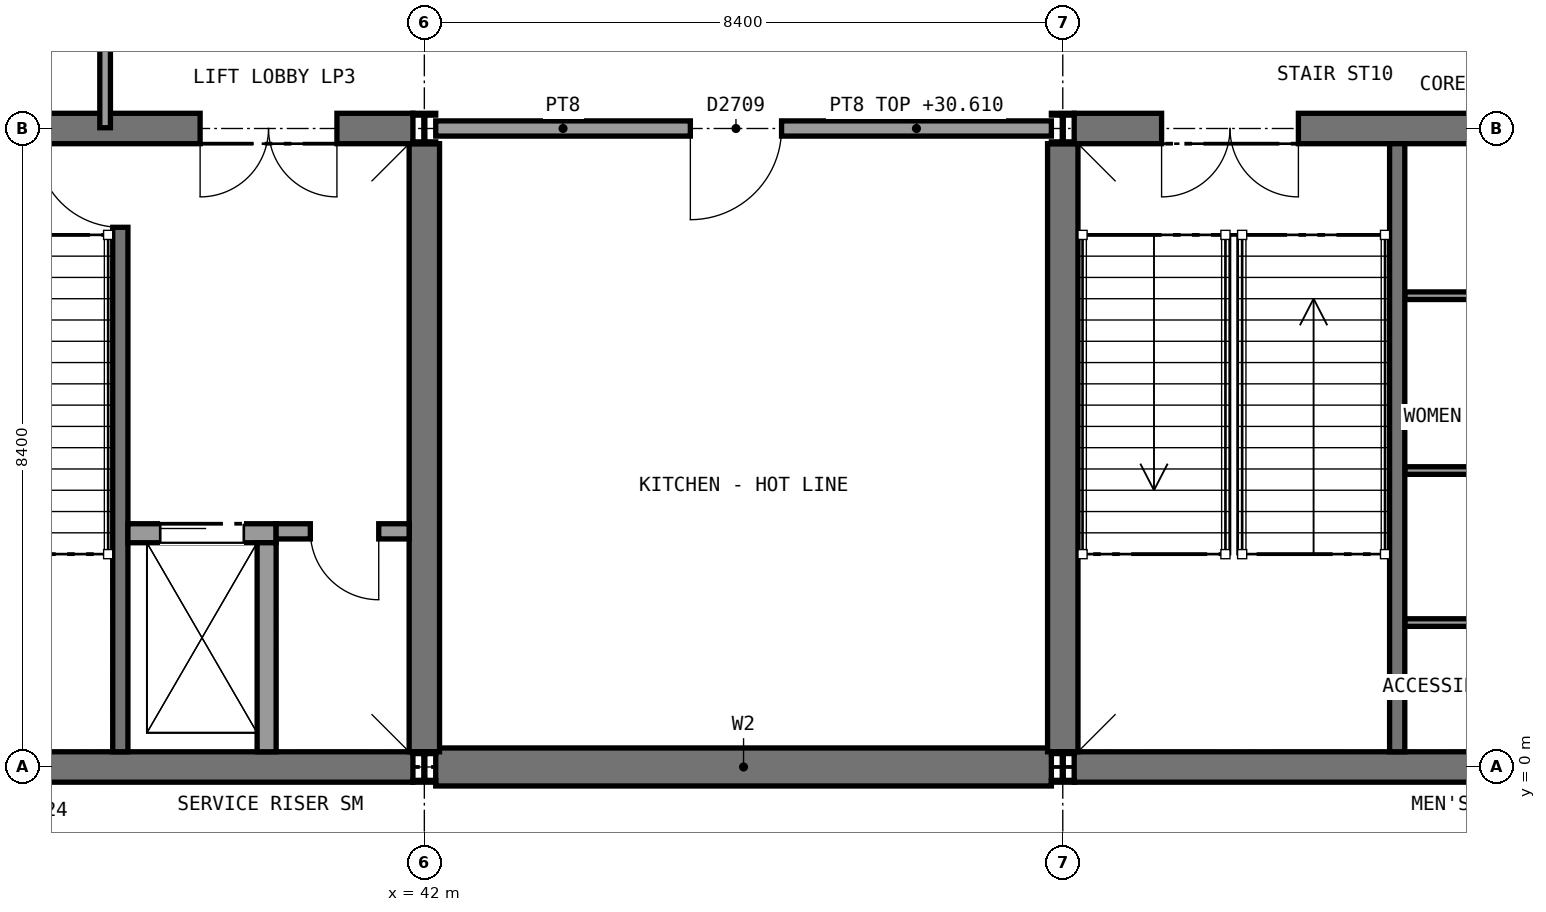
"""IFC4 building model, lengths in metres.
Left out: names, types, materials, properties, quantities, classifications, styles, units other than length and angle.
Written with IfcOpenShell. Run it as: python <this file> out.ifc"""

import sys

from ifc_helpers import new_model, si_unit, direction, frame, frame_2d, origin, origin_2d, place, context, subcontext, project, spatial, rectangle, i_section, extrude, element, fill, save


model = new_model("IFC4")
c1 = context("Model", 3, precision=1e-05, world=origin(), true_north=direction((0.0, 1.0)))
c2 = subcontext(c1, "Body", "Model", "MODEL_VIEW")
j1 = project(units=[si_unit("LENGTHUNIT", "METRE"), si_unit("PLANEANGLEUNIT", "RADIAN")], contexts=[c1])
p1 = place(None, origin())
s1 = spatial("IfcSite", under=j1, at=p1, CompositionType="ELEMENT")
p2 = place(p1, origin())
s2 = spatial("IfcBuilding", under=s1, at=p2, CompositionType="ELEMENT")
p3 = place(p2, frame((0.0, 0.0, 25.8)))
s3 = spatial("IfcBuildingStorey", under=s2, at=p3, CompositionType="ELEMENT", Elevation=25.8)
p4 = place(p3, frame((42.15, 0.0, 0.0), z_axis=(0.0, 0.0, 1.0), x_axis=(1.0, 0.0, 0.0)))
e1 = element("IfcWall", 1, at=p4, inside=s3, PredefinedType="SHEAR", context=c2, shape_type="SweptSolid", body=[
    extrude(rectangle(XDim=8.1, YDim=0.5, at=frame_2d((4.05, 0.0))), origin(), (0.0, 0.0, 1.0), 5.2),
])
p5 = place(p3, frame((33.75, 0.0, 0.0), z_axis=(0.0, 0.0, 1.0), x_axis=(1.0, 0.0, 0.0)))
e2 = element("IfcWall", 2, at=p5, inside=s3, PredefinedType="SHEAR", context=c2, shape_type="SweptSolid", body=[
    extrude(rectangle(XDim=8.1, YDim=0.4, at=frame_2d((4.05, 0.0))), origin(), (0.0, 0.0, 1.0), 4.51),
])
p6 = place(p3, frame((33.75, 8.4, 0.0), z_axis=(0.0, 0.0, 1.0), x_axis=(1.0, 0.0, 0.0)))
e3 = element("IfcWall", 3, at=p6, inside=s3, PredefinedType="SHEAR", context=c2, shape_type="SweptSolid", body=[
    extrude(rectangle(XDim=8.1, YDim=0.4, at=frame_2d((4.05, 0.0))), origin(), (0.0, 0.0, 1.0), 4.51),
])
p7 = place(p6, frame((1.15, 0.0, 0.0)))
e4 = element("IfcOpeningElement", 4, at=p7, cuts=e3, PredefinedType="OPENING", context=c2, shape_type="SweptSolid", body=[
    extrude(rectangle(XDim=1.8, YDim=2.1, at=frame_2d((0.9, 1.05))), frame((0.0, 0.21, 0.0), z_axis=(0.0, -1.0, 0.0), x_axis=(1.0, 0.0, 0.0)), (0.0, 0.0, 1.0), 0.42),
])
p8 = place(p6, frame((5.3, 0.0, 0.0)))
e5 = element("IfcOpeningElement", 5, at=p8, cuts=e3, PredefinedType="OPENING", context=c2, shape_type="SweptSolid", body=[
    extrude(rectangle(XDim=1.8, YDim=2.1, at=frame_2d((0.9, 1.05))), frame((0.0, 0.21, 0.0), z_axis=(0.0, -1.0, 0.0), x_axis=(1.0, 0.0, 0.0)), (0.0, 0.0, 1.0), 0.42),
])
p9 = place(p3, frame((42.0, 0.2, 0.0), z_axis=(0.0, 0.0, 1.0), x_axis=(0.0, 1.0, 0.0)))
e6 = element("IfcWall", 6, at=p9, inside=s3, PredefinedType="SHEAR", context=c2, shape_type="SweptSolid", body=[
    extrude(rectangle(XDim=8.0, YDim=0.4, at=frame_2d((4.0, 0.0))), origin(), (0.0, 0.0, 1.0), 5.2),
])
p10 = place(p3, frame((50.55, 0.0, 0.0), z_axis=(0.0, 0.0, 1.0), x_axis=(1.0, 0.0, 0.0)))
e7 = element("IfcWall", 7, at=p10, inside=s3, PredefinedType="SHEAR", context=c2, shape_type="SweptSolid", body=[
    extrude(rectangle(XDim=8.1, YDim=0.4, at=frame_2d((4.05, 0.0))), origin(), (0.0, 0.0, 1.0), 4.51),
])
p11 = place(p3, frame((50.55, 8.4, 0.0), z_axis=(0.0, 0.0, 1.0), x_axis=(1.0, 0.0, 0.0)))
e8 = element("IfcWall", 8, at=p11, inside=s3, PredefinedType="SHEAR", context=c2, shape_type="SweptSolid", body=[
    extrude(rectangle(XDim=8.1, YDim=0.4, at=frame_2d((4.05, 0.0))), origin(), (0.0, 0.0, 1.0), 4.51),
])
p12 = place(p11, frame((1.15, 0.0, 0.0)))
e9 = element("IfcOpeningElement", 9, at=p12, cuts=e8, PredefinedType="OPENING", context=c2, shape_type="SweptSolid", body=[
    extrude(rectangle(XDim=1.8, YDim=2.1, at=frame_2d((0.9, 1.05))), frame((0.0, 0.21, 0.0), z_axis=(0.0, -1.0, 0.0), x_axis=(1.0, 0.0, 0.0)), (0.0, 0.0, 1.0), 0.42),
])
p13 = place(p11, frame((5.6, 0.0, 0.0)))
e10 = element("IfcOpeningElement", 10, at=p13, cuts=e8, PredefinedType="OPENING", context=c2, shape_type="SweptSolid", body=[
    extrude(rectangle(XDim=1.2, YDim=2.1, at=frame_2d((0.6, 1.05))), frame((0.0, 0.21, 0.0), z_axis=(0.0, -1.0, 0.0), x_axis=(1.0, 0.0, 0.0)), (0.0, 0.0, 1.0), 0.42),
])
p14 = place(p3, frame((50.4, 0.2, 0.0), z_axis=(0.0, 0.0, 1.0), x_axis=(0.0, 1.0, 0.0)))
e11 = element("IfcWall", 11, at=p14, inside=s3, PredefinedType="SHEAR", context=c2, shape_type="SweptSolid", body=[
    extrude(rectangle(XDim=8.0, YDim=0.4, at=frame_2d((4.0, 0.0))), origin(), (0.0, 0.0, 1.0), 5.2),
])
for number, where, z_axis, x_axis in (
    (12, (42.0, 0.0, 0.0), (0.0, 0.0, 1.0), (1.0, 0.0, 0.0)),
    (13, (42.0, 8.4, 0.0), (0.0, 0.0, 1.0), (1.0, 0.0, 0.0)),
    (14, (50.4, 0.0, 0.0), (0.0, 0.0, 1.0), (1.0, 0.0, 0.0)),
    (15, (50.4, 8.4, 0.0), (0.0, 0.0, 1.0), (1.0, 0.0, 0.0)),
):
    element("IfcColumn", number, at=place(p3, frame(where, z_axis=z_axis, x_axis=x_axis)), inside=s3, PredefinedType="COLUMN", context=c2, shape_type="SweptSolid", body=[
        extrude(i_section(OverallWidth=0.3, OverallDepth=0.4, WebThickness=0.013, FlangeThickness=0.024, FilletRadius=0.027, at=origin_2d()), origin(), (0.0, 0.0, 1.0), 5.4),
    ])
p15 = place(p3, frame((54.9, 6.2, 0.0), z_axis=(0.0, 0.0, 1.0), x_axis=(1.0, 0.0, 0.0)))
e16 = element("IfcWall", 16, at=p15, inside=s3, PredefinedType="PARTITIONING", context=c2, shape_type="SweptSolid", body=[
    extrude(rectangle(XDim=2.4, YDim=0.1, at=frame_2d((1.2, 0.0))), origin(), (0.0, 0.0, 1.0), 5.2),
])
p16 = place(p15, frame((0.85, 0.0, 0.0)))
e17 = element("IfcOpeningElement", 17, at=p16, cuts=e16, PredefinedType="OPENING", context=c2, shape_type="SweptSolid", body=[
    extrude(rectangle(XDim=0.9, YDim=2.1, at=frame_2d((0.45, 1.05))), frame((0.0, 0.06, 0.0), z_axis=(0.0, -1.0, 0.0), x_axis=(1.0, 0.0, 0.0)), (0.0, 0.0, 1.0), 0.12),
])
for number, where, z_axis, x_axis in (
    (18, (54.9, 3.9, 0.0), (0.0, 0.0, 1.0), (1.0, 0.0, 0.0)),
    (19, (54.9, 1.9, 0.0), (0.0, 0.0, 1.0), (1.0, 0.0, 0.0)),
):
    element("IfcWall", number, at=place(p3, frame(where, z_axis=z_axis, x_axis=x_axis)), inside=s3, PredefinedType="PARTITIONING", context=c2, shape_type="SweptSolid", body=[
        extrude(rectangle(XDim=2.4, YDim=0.1, at=frame_2d((1.2, 0.0))), origin(), (0.0, 0.0, 1.0), 5.2),
    ])
p17 = place(p3, frame((42.15, 8.4, 0.0), z_axis=(0.0, 0.0, 1.0), x_axis=(1.0, 0.0, 0.0)))
e20 = element("IfcWall", 20, at=p17, inside=s3, PredefinedType="SOLIDWALL", context=c2, shape_type="SweptSolid", body=[
    extrude(rectangle(XDim=8.1, YDim=0.2, at=frame_2d((4.05, 0.0))), origin(), (0.0, 0.0, 1.0), 4.81),
])
p18 = place(p17, frame((3.35, 0.0, 0.0)))
e21 = element("IfcOpeningElement", 21, at=p18, cuts=e20, PredefinedType="OPENING", context=c2, shape_type="SweptSolid", body=[
    extrude(rectangle(XDim=1.2, YDim=2.1, at=frame_2d((0.6, 1.05))), frame((0.0, 0.11, 0.0), z_axis=(0.0, -1.0, 0.0), x_axis=(1.0, 0.0, 0.0)), (0.0, 0.0, 1.0), 0.22),
])
p19 = place(p3, frame((37.8, 8.41, 0.0), z_axis=(0.0, 0.0, 1.0), x_axis=(0.0, 1.0, 0.0)))
e22 = element("IfcWall", 22, at=p19, inside=s3, PredefinedType="PARTITIONING", context=c2, shape_type="SweptSolid", body=[
    extrude(rectangle(XDim=7.6, YDim=0.14, at=frame_2d((3.8, 0.0))), origin(), (0.0, 0.0, 1.0), 5.2),
])
p20 = place(p3, frame((38.0, 0.2, 0.0), z_axis=(0.0, 0.0, 1.0), x_axis=(0.0, 1.0, 0.0)))
e23 = element("IfcWall", 23, at=p20, inside=s3, PredefinedType="SHEAR", context=c2, shape_type="SweptSolid", body=[
    extrude(rectangle(XDim=8.0, YDim=0.2, at=frame_2d((4.0, 0.0))), origin(), (0.0, 0.0, 1.0), 5.2),
])
p21 = place(p20, frame((6.9, 0.0, 0.0)))
e24 = element("IfcOpeningElement", 24, at=p21, cuts=e23, PredefinedType="OPENING", context=c2, shape_type="SweptSolid", body=[
    extrude(rectangle(XDim=1.11, YDim=2.1, at=frame_2d((0.555, 1.05))), frame((0.0, 0.11, 0.0), z_axis=(0.0, -1.0, 0.0), x_axis=(1.0, 0.0, 0.0)), (0.0, 0.0, 1.0), 0.22),
])
p22 = place(p3, frame((38.1, 3.075, 0.0), z_axis=(0.0, 0.0, 1.0), x_axis=(1.0, 0.0, 0.0)))
e25 = element("IfcWall", 25, at=p22, inside=s3, PredefinedType="SOLIDWALL", context=c2, shape_type="SweptSolid", body=[
    extrude(rectangle(XDim=1.95, YDim=0.25, at=frame_2d((0.975, 0.0))), origin(), (0.0, 0.0, 1.0), 5.2),
])
p23 = place(p22, frame((0.425, 0.0, 0.0)))
e26 = element("IfcOpeningElement", 26, at=p23, cuts=e25, PredefinedType="OPENING", context=c2, shape_type="SweptSolid", body=[
    extrude(rectangle(XDim=1.1, YDim=2.1, at=frame_2d((0.55, 1.05))), frame((0.0, 0.135, 0.0), z_axis=(0.0, -1.0, 0.0), x_axis=(1.0, 0.0, 0.0)), (0.0, 0.0, 1.0), 0.27),
])
p24 = place(p3, frame((39.925, 0.2, 0.0), z_axis=(0.0, 0.0, 1.0), x_axis=(0.0, 1.0, 0.0)))
e27 = element("IfcWall", 27, at=p24, inside=s3, PredefinedType="SOLIDWALL", context=c2, shape_type="SweptSolid", body=[
    extrude(rectangle(XDim=2.75, YDim=0.25, at=frame_2d((1.375, 0.0))), origin(), (0.0, 0.0, 1.0), 5.2),
])
p25 = place(p3, frame((40.05, 3.1, 0.0), z_axis=(0.0, 0.0, 1.0), x_axis=(1.0, 0.0, 0.0)))
e28 = element("IfcWall", 28, at=p25, inside=s3, PredefinedType="PARTITIONING", context=c2, shape_type="SweptSolid", body=[
    extrude(rectangle(XDim=1.75, YDim=0.2, at=frame_2d((0.875, 0.0))), origin(), (0.0, 0.0, 1.0), 5.2),
])
p26 = place(p25, frame((0.45, 0.0, 0.0)))
e29 = element("IfcOpeningElement", 29, at=p26, cuts=e28, PredefinedType="OPENING", context=c2, shape_type="SweptSolid", body=[
    extrude(rectangle(XDim=0.9, YDim=2.1, at=frame_2d((0.45, 1.05))), frame((0.0, 0.11, 0.0), z_axis=(0.0, -1.0, 0.0), x_axis=(1.0, 0.0, 0.0)), (0.0, 0.0, 1.0), 0.22),
])
p27 = place(p3, frame((54.8, 0.2, 0.0), z_axis=(0.0, 0.0, 1.0), x_axis=(0.0, 1.0, 0.0)))
e30 = element("IfcWall", 30, at=p27, inside=s3, PredefinedType="SHEAR", context=c2, shape_type="SweptSolid", body=[
    extrude(rectangle(XDim=8.0, YDim=0.2, at=frame_2d((4.0, 0.0))), origin(), (0.0, 0.0, 1.0), 5.2),
])
p28 = place(p18, frame((1.2, 0.0, 0.0), z_axis=(0.0, 0.0, 1.0), x_axis=(-1.0, 0.0, 0.0)))
e31 = element("IfcDoor", 31, at=p28, inside=s3, OperationType="SINGLE_SWING_RIGHT", PredefinedType="DOOR", context=c2, shape_type="SweptSolid", body=[
    extrude(rectangle(XDim=1.2, YDim=2.1, at=frame_2d((0.6, 1.05))), frame((0.0, 0.025, 0.0), z_axis=(0.0, -1.0, 0.0), x_axis=(1.0, 0.0, 0.0)), (0.0, 0.0, 1.0), 0.05),
])
fill(e21, e31)
p29 = place(p21, origin())
e32 = element("IfcDoor", 32, at=p29, inside=s3, OperationType="SINGLE_SWING_RIGHT", PredefinedType="DOOR", context=c2, shape_type="SweptSolid", body=[
    extrude(rectangle(XDim=1.1, YDim=2.1, at=frame_2d((0.55, 1.05))), frame((0.0, 0.025, 0.0), z_axis=(0.0, -1.0, 0.0), x_axis=(1.0, 0.0, 0.0)), (0.0, 0.0, 1.0), 0.05),
])
fill(e24, e32)
p30 = place(p23, origin())
e33 = element("IfcDoor", 33, at=p30, inside=s3, OperationType="SLIDING_TO_LEFT", PredefinedType="DOOR", context=c2, shape_type="SweptSolid", body=[
    extrude(rectangle(XDim=1.1, YDim=2.1, at=frame_2d((0.55, 1.05))), frame((0.0, 0.025, 0.0), z_axis=(0.0, -1.0, 0.0), x_axis=(1.0, 0.0, 0.0)), (0.0, 0.0, 1.0), 0.05),
])
fill(e26, e33)
p31 = place(p26, frame((0.9, 0.0, 0.0), z_axis=(0.0, 0.0, 1.0), x_axis=(-1.0, 0.0, 0.0)))
e34 = element("IfcDoor", 34, at=p31, inside=s3, OperationType="SINGLE_SWING_LEFT", PredefinedType="DOOR", context=c2, shape_type="SweptSolid", body=[
    extrude(rectangle(XDim=0.9, YDim=2.1, at=frame_2d((0.45, 1.05))), frame((0.0, 0.025, 0.0), z_axis=(0.0, -1.0, 0.0), x_axis=(1.0, 0.0, 0.0)), (0.0, 0.0, 1.0), 0.05),
])
fill(e29, e34)
p32 = place(p8, frame((1.8, 0.0, 0.0), z_axis=(0.0, 0.0, 1.0), x_axis=(-1.0, 0.0, 0.0)))
e35 = element("IfcDoor", 35, at=p32, inside=s3, OperationType="DOUBLE_DOOR_SINGLE_SWING", PredefinedType="DOOR", context=c2, shape_type="SweptSolid", body=[
    extrude(rectangle(XDim=1.8, YDim=2.1, at=frame_2d((0.9, 1.05))), frame((0.0, 0.025, 0.0), z_axis=(0.0, -1.0, 0.0), x_axis=(1.0, 0.0, 0.0)), (0.0, 0.0, 1.0), 0.05),
])
fill(e5, e35)
p33 = place(p12, frame((1.8, 0.0, 0.0), z_axis=(0.0, 0.0, 1.0), x_axis=(-1.0, 0.0, 0.0)))
e36 = element("IfcDoor", 36, at=p33, inside=s3, OperationType="DOUBLE_DOOR_SINGLE_SWING", PredefinedType="DOOR", context=c2, shape_type="SweptSolid", body=[
    extrude(rectangle(XDim=1.8, YDim=2.1, at=frame_2d((0.9, 1.05))), frame((0.0, 0.025, 0.0), z_axis=(0.0, -1.0, 0.0), x_axis=(1.0, 0.0, 0.0)), (0.0, 0.0, 1.0), 0.05),
])
fill(e9, e36)
save(model, sys.argv[1])
